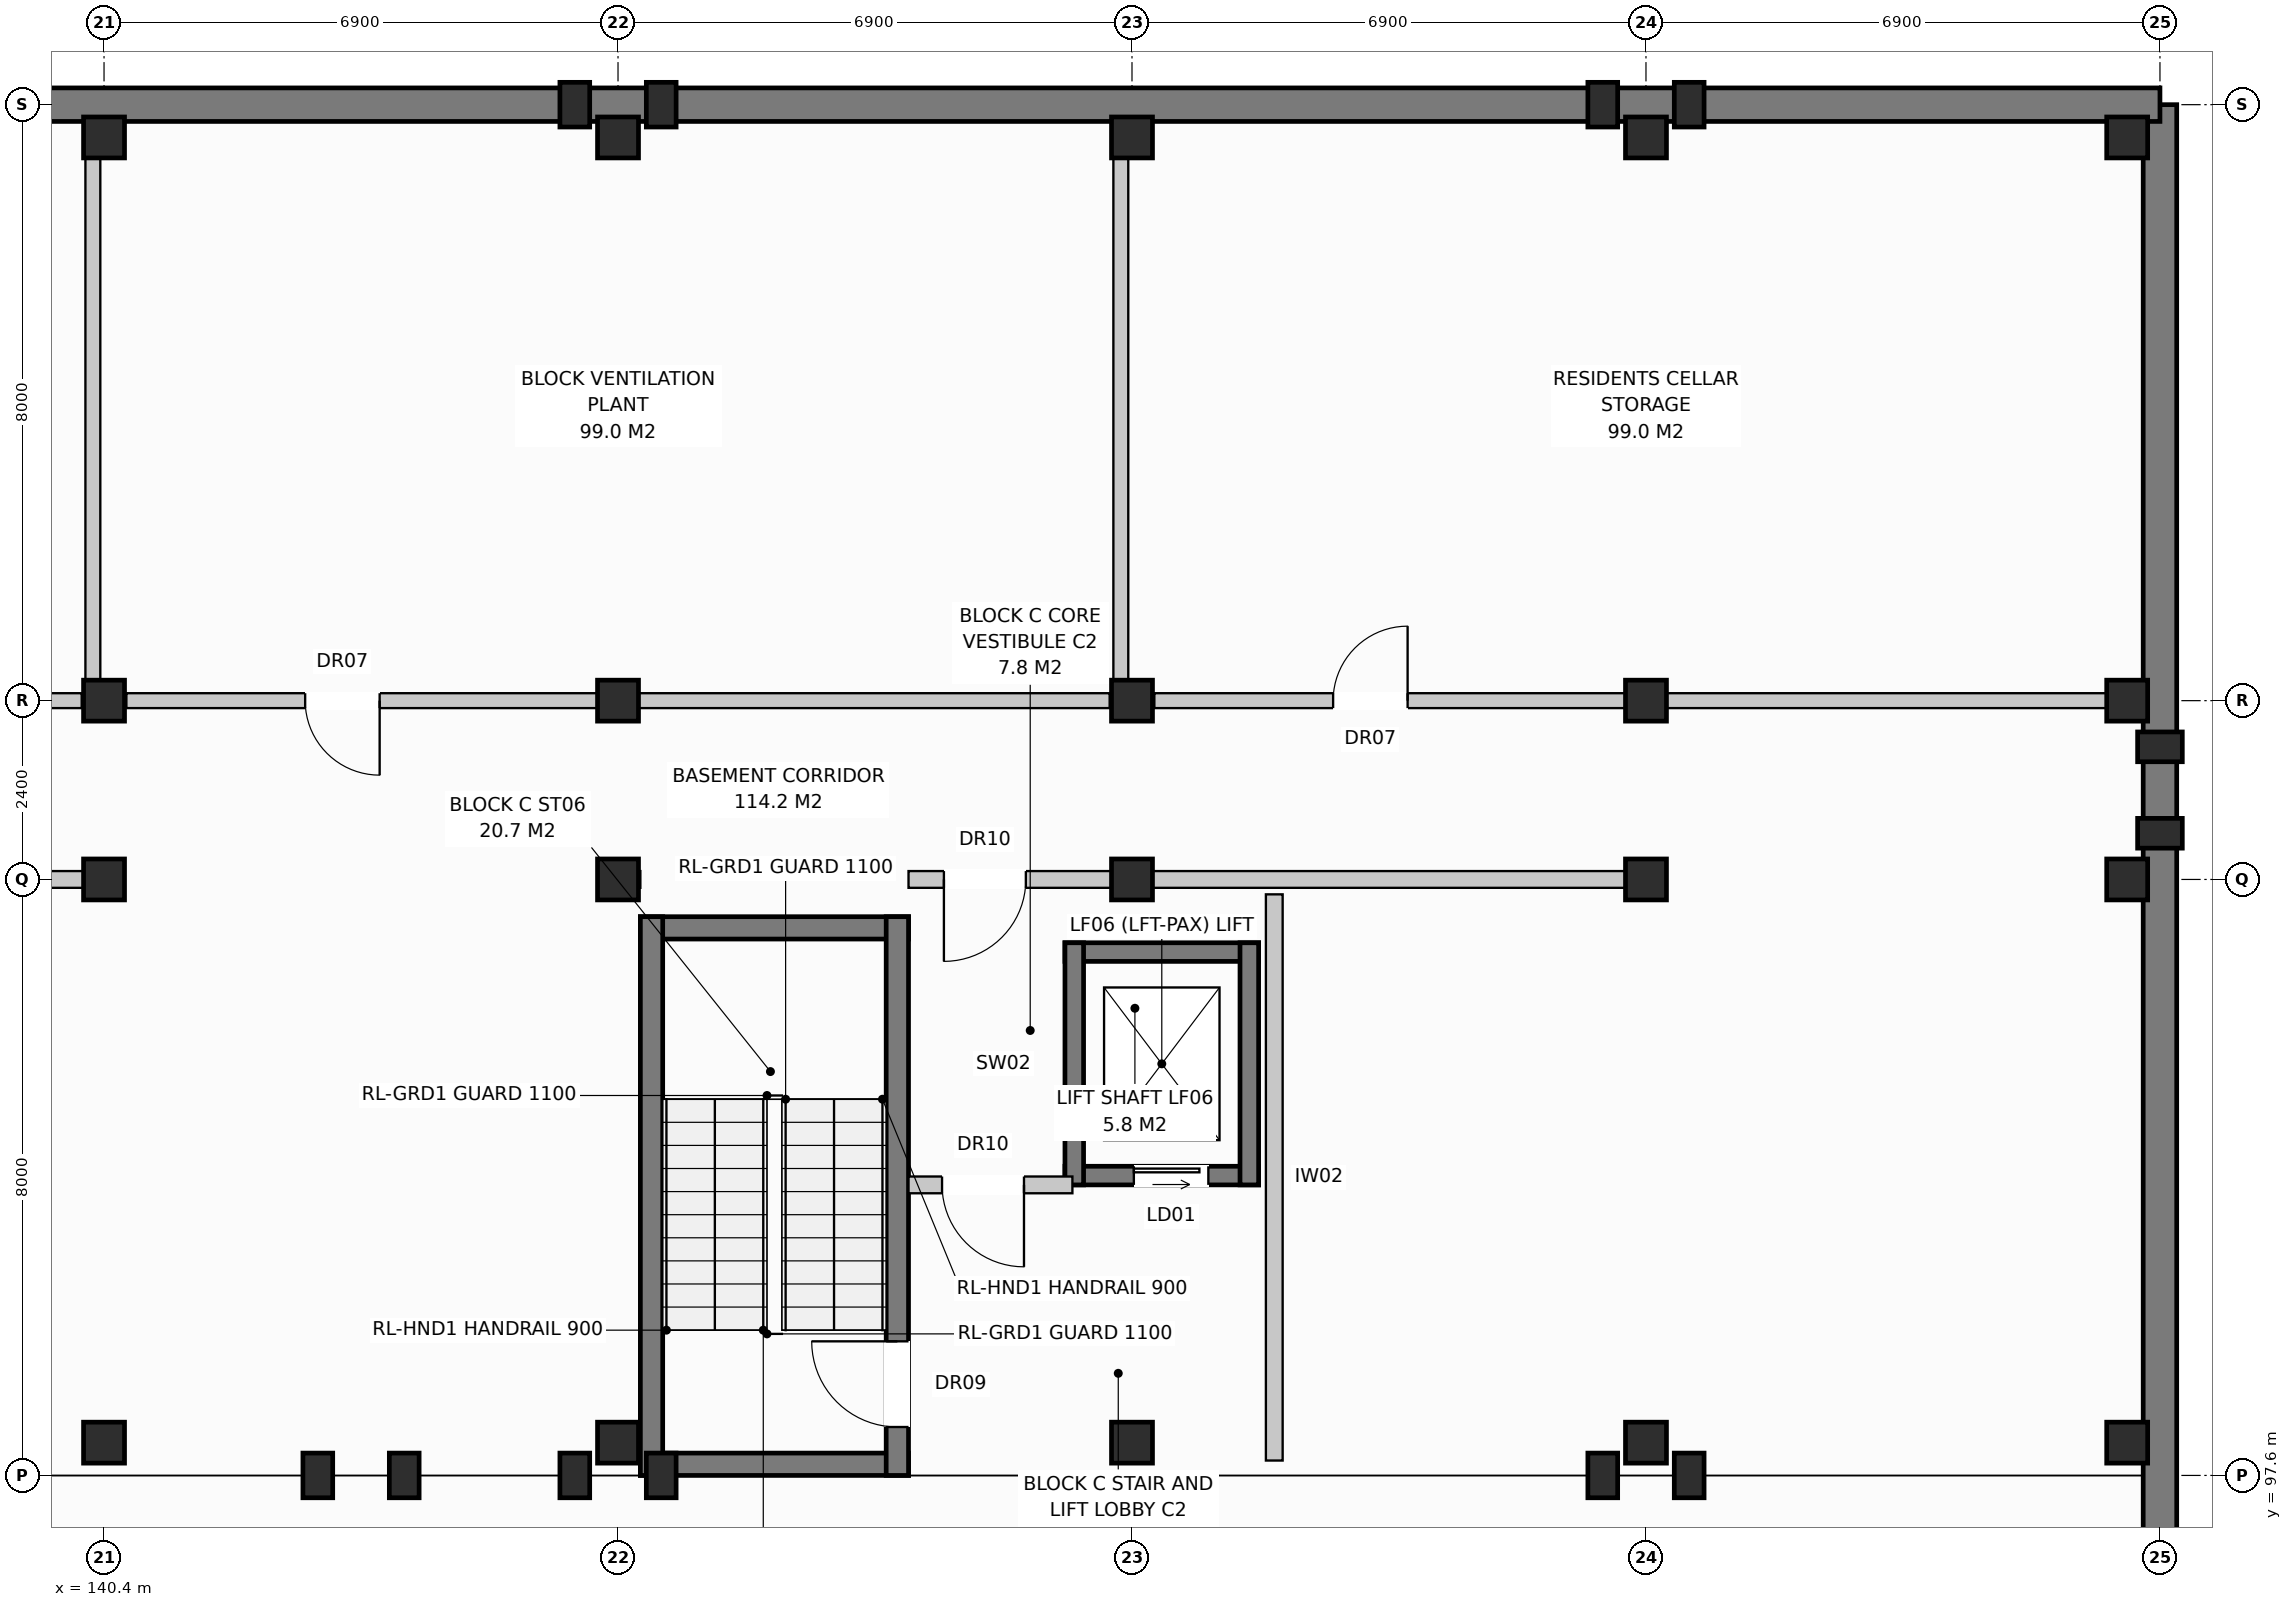
"""IFC4 building model, lengths in metres.
Left out: names, types, materials, properties, quantities, classifications, styles, units other than length and angle.
Written with IfcOpenShell. Run it as: python <this file> out.ifc"""

import sys

from ifc_helpers import new_model, si_unit, direction, frame, frame_2d, origin, origin_with_axes, origin_2d, place, context, subcontext, project, spatial, rectangle, extrude, element, fill, save


model = new_model("IFC4")
c1 = context("Model", 3, precision=1e-05, world=origin(), true_north=direction((0.0, 1.0)))
c2 = subcontext(c1, "Body", "Model", "MODEL_VIEW")
j1 = project(units=[si_unit("LENGTHUNIT", "METRE"), si_unit("PLANEANGLEUNIT", "RADIAN")], contexts=[c1])
p1 = place(None, origin())
s1 = spatial("IfcSite", under=j1, at=p1, CompositionType="ELEMENT")
p2 = place(p1, origin())
s2 = spatial("IfcBuilding", under=s1, at=p2, CompositionType="ELEMENT")
p3 = place(p2, frame((0.0, 0.0, -3.8)))
s3 = spatial("IfcBuildingStorey", under=s2, at=p3, CompositionType="ELEMENT", Elevation=-3.8)
for number, where, z_axis, x_axis in (
    (1, (140.4, 98.04, 0.0), (0.0, 0.0, 1.0), (1.0, 0.0, 0.0)),
    (2, (140.4, 105.6, 0.0), (0.0, 0.0, 1.0), (1.0, 0.0, 0.0)),
    (3, (140.4, 108.0, 0.0), (0.0, 0.0, 1.0), (1.0, 0.0, 0.0)),
    (4, (140.4, 115.56, 0.0), (0.0, 0.0, 1.0), (1.0, 0.0, 0.0)),
    (5, (147.3, 98.04, 0.0), (0.0, 0.0, 1.0), (1.0, 0.0, 0.0)),
    (6, (147.3, 105.6, 0.0), (0.0, 0.0, 1.0), (1.0, 0.0, 0.0)),
    (7, (147.3, 108.0, 0.0), (0.0, 0.0, 1.0), (1.0, 0.0, 0.0)),
    (8, (147.3, 115.56, 0.0), (0.0, 0.0, 1.0), (1.0, 0.0, 0.0)),
    (9, (154.2, 98.04, 0.0), (0.0, 0.0, 1.0), (1.0, 0.0, 0.0)),
    (10, (154.2, 105.6, 0.0), (0.0, 0.0, 1.0), (1.0, 0.0, 0.0)),
    (11, (154.2, 108.0, 0.0), (0.0, 0.0, 1.0), (1.0, 0.0, 0.0)),
    (12, (154.2, 115.56, 0.0), (0.0, 0.0, 1.0), (1.0, 0.0, 0.0)),
    (13, (161.1, 98.04, 0.0), (0.0, 0.0, 1.0), (1.0, 0.0, 0.0)),
    (14, (161.1, 105.6, 0.0), (0.0, 0.0, 1.0), (1.0, 0.0, 0.0)),
    (15, (161.1, 108.0, 0.0), (0.0, 0.0, 1.0), (1.0, 0.0, 0.0)),
    (16, (161.1, 115.56, 0.0), (0.0, 0.0, 1.0), (1.0, 0.0, 0.0)),
    (17, (167.56, 98.04, 0.0), (0.0, 0.0, 1.0), (1.0, 0.0, 0.0)),
    (18, (167.56, 105.6, 0.0), (0.0, 0.0, 1.0), (1.0, 0.0, 0.0)),
    (19, (167.56, 108.0, 0.0), (0.0, 0.0, 1.0), (1.0, 0.0, 0.0)),
    (20, (167.56, 115.56, 0.0), (0.0, 0.0, 1.0), (1.0, 0.0, 0.0)),
):
    element("IfcColumn", number, at=place(p3, frame(where, z_axis=z_axis, x_axis=x_axis)), inside=s3, PredefinedType="COLUMN", context=c2, shape_type="SweptSolid", body=[
        extrude(rectangle(XDim=0.55, YDim=0.55, at=origin_2d()), origin(), (0.0, 0.0, 1.0), 3.8),
    ])
for number, where, z_axis, x_axis in (
    (21, (146.72, 116.0, 0.0), (0.0, 0.0, 1.0), (1.0, 0.0, 0.0)),
    (22, (146.72, 97.6, 0.0), (0.0, 0.0, 1.0), (1.0, 0.0, 0.0)),
    (23, (147.88, 116.0, 0.0), (0.0, 0.0, 1.0), (1.0, 0.0, 0.0)),
    (24, (147.88, 97.6, 0.0), (0.0, 0.0, 1.0), (1.0, 0.0, 0.0)),
    (25, (160.52, 116.0, 0.0), (0.0, 0.0, 1.0), (1.0, 0.0, 0.0)),
    (26, (160.52, 97.6, 0.0), (0.0, 0.0, 1.0), (1.0, 0.0, 0.0)),
    (27, (161.68, 116.0, 0.0), (0.0, 0.0, 1.0), (1.0, 0.0, 0.0)),
    (28, (161.68, 97.6, 0.0), (0.0, 0.0, 1.0), (1.0, 0.0, 0.0)),
    (29, (143.27, 97.6, 0.0), (0.0, 0.0, 1.0), (1.0, 0.0, 0.0)),
    (30, (144.43, 97.6, 0.0), (0.0, 0.0, 1.0), (1.0, 0.0, 0.0)),
    (31, (168.0, 106.22, 0.0), (0.0, 0.0, 1.0), (0.0, 1.0, 0.0)),
    (32, (168.0, 107.38, 0.0), (0.0, 0.0, 1.0), (0.0, 1.0, 0.0)),
):
    element("IfcColumn", number, at=place(p3, frame(where, z_axis=z_axis, x_axis=x_axis)), inside=s3, PredefinedType="PILASTER", context=c2, shape_type="SweptSolid", body=[
        extrude(rectangle(XDim=0.4, YDim=0.6, at=origin_2d()), origin(), (0.0, 0.0, 1.0), 3.8),
    ])
p4 = place(p3, frame((168.0, 0.0, 0.0), z_axis=(0.0, 0.0, 1.0), x_axis=(0.0, 1.0, 0.0)))
e33 = element("IfcWall", 33, at=p4, inside=s3, PredefinedType="STANDARD", context=c2, shape_type="SweptSolid", body=[
    extrude(rectangle(XDim=116.0, YDim=0.45, at=frame_2d((58.0, 0.0))), origin(), (0.0, 0.0, 1.0), 3.48),
])
p5 = place(p3, frame((168.0, 116.0, 0.0), z_axis=(0.0, 0.0, 1.0), x_axis=(-1.0, 0.0, 0.0)))
e34 = element("IfcWall", 34, at=p5, inside=s3, PredefinedType="STANDARD", context=c2, shape_type="SweptSolid", body=[
    extrude(rectangle(XDim=168.0, YDim=0.45, at=frame_2d((84.0, 0.0))), origin(), (0.0, 0.0, 1.0), 3.48),
])
p6 = place(p3, frame((130.5, 105.6, 0.0), z_axis=(0.0, 0.0, 1.0), x_axis=(1.0, 0.0, 0.0)))
e35 = element("IfcWall", 35, at=p6, inside=s3, PredefinedType="PARTITIONING", context=c2, shape_type="SweptSolid", body=[
    extrude(rectangle(XDim=9.9, YDim=0.225, at=frame_2d((4.95, 0.0))), origin(), (0.0, 0.0, 1.0), 2.92),
])
p7 = place(p6, frame((0.475, 0.0, 0.0)))
e36 = element("IfcOpeningElement", 36, at=p7, cuts=e35, PredefinedType="OPENING", context=c2, shape_type="SweptSolid", body=[
    extrude(rectangle(XDim=1.1, YDim=2.15, at=frame_2d((0.55, 1.075))), frame((0.0, 0.125, 0.0), z_axis=(0.0, -1.0, 0.0), x_axis=(1.0, 0.0, 0.0)), (0.0, 0.0, 1.0), 0.249),
])
for number, where, z_axis, x_axis in (
    (37, (147.6, 97.75, 0.0), (0.0, 0.0, 1.0), (1.0, 0.0, 0.0)),
    (38, (147.6, 104.95, 0.0), (0.0, 0.0, 1.0), (1.0, 0.0, 0.0)),
):
    element("IfcWall", number, at=place(p3, frame(where, z_axis=z_axis, x_axis=x_axis)), inside=s3, PredefinedType="SHEAR", context=c2, shape_type="SweptSolid", body=[
        extrude(rectangle(XDim=3.6, YDim=0.3, at=frame_2d((1.8, 0.0))), origin(), (0.0, 0.0, 1.0), 3.48),
    ])
p8 = place(p3, frame((147.75, 97.6, 0.0), z_axis=(0.0, 0.0, 1.0), x_axis=(0.0, 1.0, 0.0)))
e39 = element("IfcWall", 39, at=p8, inside=s3, PredefinedType="SHEAR", context=c2, shape_type="SweptSolid", body=[
    extrude(rectangle(XDim=7.5, YDim=0.3, at=frame_2d((3.75, 0.0))), origin(), (0.0, 0.0, 1.0), 3.48),
])
p9 = place(p3, frame((151.05, 97.6, 0.0), z_axis=(0.0, 0.0, 1.0), x_axis=(0.0, 1.0, 0.0)))
e40 = element("IfcWall", 40, at=p9, inside=s3, PredefinedType="SHEAR", context=c2, shape_type="SweptSolid", body=[
    extrude(rectangle(XDim=7.5, YDim=0.3, at=frame_2d((3.75, 0.0))), origin(), (0.0, 0.0, 1.0), 3.48),
])
p10 = place(p9, frame((0.65, 0.0, 0.0)))
e41 = element("IfcOpeningElement", 41, at=p10, cuts=e40, PredefinedType="OPENING", context=c2, shape_type="SweptSolid", body=[
    extrude(rectangle(XDim=1.15, YDim=2.15, at=frame_2d((0.575, 1.075))), frame((0.0, 0.162, 0.0), z_axis=(0.0, -1.0, 0.0), x_axis=(1.0, 0.0, 0.0)), (0.0, 0.0, 1.0), 0.324),
])
p11 = place(p3, frame((153.3, 101.625, 0.0), z_axis=(0.0, 0.0, 1.0), x_axis=(1.0, 0.0, 0.0)))
e42 = element("IfcWall", 42, at=p11, inside=s3, PredefinedType="SHEAR", context=c2, shape_type="SweptSolid", body=[
    extrude(rectangle(XDim=2.6, YDim=0.25, at=frame_2d((1.3, 0.0))), origin(), (0.0, 0.0, 1.0), 3.48),
])
p12 = place(p11, frame((0.925, 0.0, 0.0)))
e43 = element("IfcOpeningElement", 43, at=p12, cuts=e42, PredefinedType="OPENING", context=c2, shape_type="SweptSolid", body=[
    extrude(rectangle(XDim=1.0, YDim=2.1, at=frame_2d((0.5, 1.05))), frame((0.0, 0.137, 0.0), z_axis=(0.0, -1.0, 0.0), x_axis=(1.0, 0.0, 0.0)), (0.0, 0.0, 1.0), 0.274),
])
p13 = place(p3, frame((153.3, 104.625, 0.0), z_axis=(0.0, 0.0, 1.0), x_axis=(1.0, 0.0, 0.0)))
e44 = element("IfcWall", 44, at=p13, inside=s3, PredefinedType="SHEAR", context=c2, shape_type="SweptSolid", body=[
    extrude(rectangle(XDim=2.6, YDim=0.25, at=frame_2d((1.3, 0.0))), origin(), (0.0, 0.0, 1.0), 3.48),
])
for number, where, z_axis, x_axis in (
    (45, (153.425, 101.5, 0.0), (0.0, 0.0, 1.0), (0.0, 1.0, 0.0)),
    (46, (155.775, 101.5, 0.0), (0.0, 0.0, 1.0), (0.0, 1.0, 0.0)),
):
    element("IfcWall", number, at=place(p3, frame(where, z_axis=z_axis, x_axis=x_axis)), inside=s3, PredefinedType="SHEAR", context=c2, shape_type="SweptSolid", body=[
        extrude(rectangle(XDim=3.25, YDim=0.25, at=frame_2d((1.625, 0.0))), origin(), (0.0, 0.0, 1.0), 3.48),
    ])
p14 = place(p3, frame((156.11, 97.8, 0.0), z_axis=(0.0, 0.0, 1.0), x_axis=(0.0, 1.0, 0.0)))
e47 = element("IfcWall", 47, at=p14, inside=s3, PredefinedType="PARTITIONING", context=c2, shape_type="SweptSolid", body=[
    extrude(rectangle(XDim=7.6, YDim=0.225, at=frame_2d((3.8, 0.0))), origin(), (0.0, 0.0, 1.0), 3.19),
])
p15 = place(p3, frame((151.2, 101.5, 0.0), z_axis=(0.0, 0.0, 1.0), x_axis=(1.0, 0.0, 0.0)))
e48 = element("IfcWall", 48, at=p15, inside=s3, PredefinedType="PARTITIONING", context=c2, shape_type="SweptSolid", body=[
    extrude(rectangle(XDim=2.2, YDim=0.225, at=frame_2d((1.1, 0.0))), origin(), (0.0, 0.0, 1.0), 3.48),
])
p16 = place(p15, frame((0.45, 0.0, 0.0)))
e49 = element("IfcOpeningElement", 49, at=p16, cuts=e48, PredefinedType="OPENING", context=c2, shape_type="SweptSolid", body=[
    extrude(rectangle(XDim=1.1, YDim=2.15, at=frame_2d((0.55, 1.075))), frame((0.0, 0.125, 0.0), z_axis=(0.0, -1.0, 0.0), x_axis=(1.0, 0.0, 0.0)), (0.0, 0.0, 1.0), 0.249),
])
p17 = place(p3, frame((147.3, 105.6, 0.0), z_axis=(0.0, 0.0, 1.0), x_axis=(1.0, 0.0, 0.0)))
e50 = element("IfcWall", 50, at=p17, inside=s3, PredefinedType="PARTITIONING", context=c2, shape_type="SweptSolid", body=[
    extrude(rectangle(XDim=0.3, YDim=0.225, at=frame_2d((0.15, 0.0))), origin(), (0.0, 0.0, 1.0), 3.48),
])
p18 = place(p3, frame((151.2, 105.6, 0.0), z_axis=(0.0, 0.0, 1.0), x_axis=(1.0, 0.0, 0.0)))
e51 = element("IfcWall", 51, at=p18, inside=s3, PredefinedType="PARTITIONING", context=c2, shape_type="SweptSolid", body=[
    extrude(rectangle(XDim=9.9, YDim=0.225, at=frame_2d((4.95, 0.0))), origin(), (0.0, 0.0, 1.0), 2.92),
])
p19 = place(p18, frame((0.475, 0.0, 0.0)))
e52 = element("IfcOpeningElement", 52, at=p19, cuts=e51, PredefinedType="OPENING", context=c2, shape_type="SweptSolid", body=[
    extrude(rectangle(XDim=1.1, YDim=2.15, at=frame_2d((0.55, 1.075))), frame((0.0, 0.125, 0.0), z_axis=(0.0, -1.0, 0.0), x_axis=(1.0, 0.0, 0.0)), (0.0, 0.0, 1.0), 0.249),
])
p20 = place(p3, frame((126.9, 108.0, 0.0), z_axis=(0.0, 0.0, 1.0), x_axis=(1.0, 0.0, 0.0)))
e53 = element("IfcWall", 53, at=p20, inside=s3, PredefinedType="PARTITIONING", context=c2, shape_type="SweptSolid", body=[
    extrude(rectangle(XDim=13.2, YDim=0.2, at=frame_2d((6.6, 0.0))), origin(), (0.0, 0.0, 1.0), 2.92),
])
p21 = place(p20, frame((2.4, 0.0, 0.0)))
e54 = element("IfcOpeningElement", 54, at=p21, cuts=e53, PredefinedType="OPENING", context=c2, shape_type="SweptSolid", body=[
    extrude(rectangle(XDim=1.0, YDim=2.15, at=frame_2d((0.5, 1.075))), frame((0.0, 0.112, 0.0), z_axis=(0.0, -1.0, 0.0), x_axis=(1.0, 0.0, 0.0)), (0.0, 0.0, 1.0), 0.224),
])
p22 = place(p3, frame((140.25, 108.2, 0.0), z_axis=(0.0, 0.0, 1.0), x_axis=(0.0, 1.0, 0.0)))
e55 = element("IfcWall", 55, at=p22, inside=s3, PredefinedType="PARTITIONING", context=c2, shape_type="SweptSolid", body=[
    extrude(rectangle(XDim=7.5, YDim=0.2, at=frame_2d((3.75, 0.0))), origin(), (0.0, 0.0, 1.0), 3.48),
])
p23 = place(p3, frame((140.7, 108.0, 0.0), z_axis=(0.0, 0.0, 1.0), x_axis=(1.0, 0.0, 0.0)))
e56 = element("IfcWall", 56, at=p23, inside=s3, PredefinedType="PARTITIONING", context=c2, shape_type="SweptSolid", body=[
    extrude(rectangle(XDim=13.2, YDim=0.2, at=frame_2d((6.6, 0.0))), origin(), (0.0, 0.0, 1.0), 2.92),
])
p24 = place(p23, frame((2.4, 0.0, 0.0)))
e57 = element("IfcOpeningElement", 57, at=p24, cuts=e56, PredefinedType="OPENING", context=c2, shape_type="SweptSolid", body=[
    extrude(rectangle(XDim=1.0, YDim=2.15, at=frame_2d((0.5, 1.075))), frame((0.0, 0.112, 0.0), z_axis=(0.0, -1.0, 0.0), x_axis=(1.0, 0.0, 0.0)), (0.0, 0.0, 1.0), 0.224),
])
p25 = place(p3, frame((154.05, 108.2, 0.0), z_axis=(0.0, 0.0, 1.0), x_axis=(0.0, 1.0, 0.0)))
e58 = element("IfcWall", 58, at=p25, inside=s3, PredefinedType="PARTITIONING", context=c2, shape_type="SweptSolid", body=[
    extrude(rectangle(XDim=7.5, YDim=0.2, at=frame_2d((3.75, 0.0))), origin(), (0.0, 0.0, 1.0), 3.48),
])
p26 = place(p3, frame((154.5, 108.0, 0.0), z_axis=(0.0, 0.0, 1.0), x_axis=(1.0, 0.0, 0.0)))
e59 = element("IfcWall", 59, at=p26, inside=s3, PredefinedType="PARTITIONING", context=c2, shape_type="SweptSolid", body=[
    extrude(rectangle(XDim=13.2, YDim=0.2, at=frame_2d((6.6, 0.0))), origin(), (0.0, 0.0, 1.0), 2.92),
])
p27 = place(p26, frame((2.4, 0.0, 0.0)))
e60 = element("IfcOpeningElement", 60, at=p27, cuts=e59, PredefinedType="OPENING", context=c2, shape_type="SweptSolid", body=[
    extrude(rectangle(XDim=1.0, YDim=2.15, at=frame_2d((0.5, 1.075))), frame((0.0, 0.112, 0.0), z_axis=(0.0, -1.0, 0.0), x_axis=(1.0, 0.0, 0.0)), (0.0, 0.0, 1.0), 0.224),
])
p28 = place(p10, origin_with_axes())
e61 = element("IfcDoor", 61, at=p28, inside=s3, OperationType="SINGLE_SWING_RIGHT", PredefinedType="DOOR", context=c2, shape_type="SweptSolid", body=[
    extrude(rectangle(XDim=1.15, YDim=2.15, at=frame_2d((0.575, 1.075))), frame((0.0, 0.025, 0.0), z_axis=(0.0, -1.0, 0.0), x_axis=(1.0, 0.0, 0.0)), (0.0, 0.0, 1.0), 0.05),
])
fill(e41, e61)
p29 = place(p12, origin_with_axes())
e62 = element("IfcDoor", 62, at=p29, inside=s3, OperationType="SLIDING_TO_LEFT", PredefinedType="DOOR", context=c2, shape_type="SweptSolid", body=[
    extrude(rectangle(XDim=1.0, YDim=2.1, at=frame_2d((0.5, 1.05))), frame((0.0, 0.025, 0.0), z_axis=(0.0, -1.0, 0.0), x_axis=(1.0, 0.0, 0.0)), (0.0, 0.0, 1.0), 0.05),
])
fill(e43, e62)
p30 = place(p16, frame((1.1, 0.0, 0.0), z_axis=(0.0, 0.0, 1.0), x_axis=(-1.0, 0.0, 0.0)))
e63 = element("IfcDoor", 63, at=p30, inside=s3, OperationType="SINGLE_SWING_RIGHT", PredefinedType="DOOR", context=c2, shape_type="SweptSolid", body=[
    extrude(rectangle(XDim=1.1, YDim=2.15, at=frame_2d((0.55, 1.075))), frame((0.0, 0.025, 0.0), z_axis=(0.0, -1.0, 0.0), x_axis=(1.0, 0.0, 0.0)), (0.0, 0.0, 1.0), 0.05),
])
fill(e49, e63)
p31 = place(p19, frame((1.1, 0.0, 0.0), z_axis=(0.0, 0.0, 1.0), x_axis=(-1.0, 0.0, 0.0)))
e64 = element("IfcDoor", 64, at=p31, inside=s3, OperationType="SINGLE_SWING_LEFT", PredefinedType="DOOR", context=c2, shape_type="SweptSolid", body=[
    extrude(rectangle(XDim=1.1, YDim=2.15, at=frame_2d((0.55, 1.075))), frame((0.0, 0.025, 0.0), z_axis=(0.0, -1.0, 0.0), x_axis=(1.0, 0.0, 0.0)), (0.0, 0.0, 1.0), 0.05),
])
fill(e52, e64)
p32 = place(p24, frame((1.0, 0.0, 0.0), z_axis=(0.0, 0.0, 1.0), x_axis=(-1.0, 0.0, 0.0)))
e65 = element("IfcDoor", 65, at=p32, inside=s3, OperationType="SINGLE_SWING_RIGHT", PredefinedType="DOOR", context=c2, shape_type="SweptSolid", body=[
    extrude(rectangle(XDim=1.0, YDim=2.15, at=frame_2d((0.5, 1.075))), frame((0.0, 0.025, 0.0), z_axis=(0.0, -1.0, 0.0), x_axis=(1.0, 0.0, 0.0)), (0.0, 0.0, 1.0), 0.05),
])
fill(e57, e65)
p33 = place(p27, origin_with_axes())
e66 = element("IfcDoor", 66, at=p33, inside=s3, OperationType="SINGLE_SWING_RIGHT", PredefinedType="DOOR", context=c2, shape_type="SweptSolid", body=[
    extrude(rectangle(XDim=1.0, YDim=2.15, at=frame_2d((0.5, 1.075))), frame((0.0, 0.025, 0.0), z_axis=(0.0, -1.0, 0.0), x_axis=(1.0, 0.0, 0.0)), (0.0, 0.0, 1.0), 0.05),
])
fill(e60, e66)
save(model, sys.argv[1])
